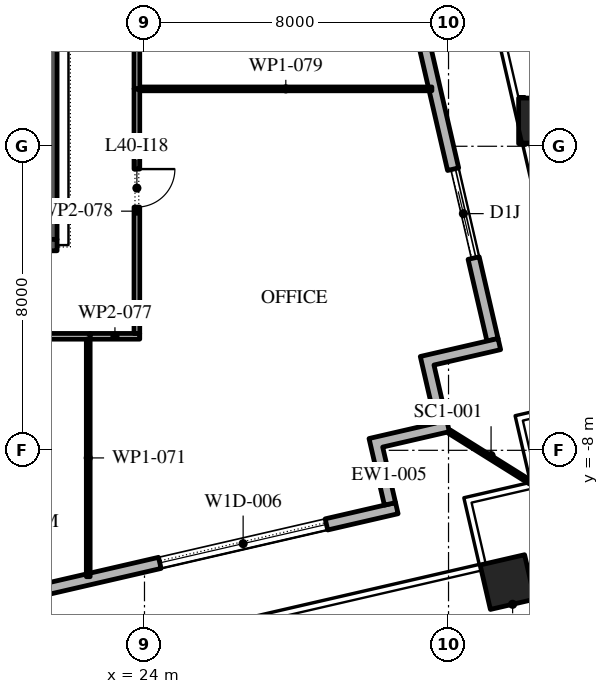
"""IFC4 building model, lengths in metres.
Left out: names, types, materials, properties, quantities, classifications, styles, units other than length and angle.
Written with IfcOpenShell. Run it as: python <this file> out.ifc"""

import sys

from ifc_helpers import new_model, si_unit, direction, frame, frame_2d, origin, origin_2d, place, context, subcontext, project, spatial, polyline, rectangle, outline, extrude, element, fill, save


model = new_model("IFC4")
c1 = context("Model", 3, precision=1e-05, world=origin(), true_north=direction((0.0, 1.0)))
c2 = subcontext(c1, "Body", "Model", "MODEL_VIEW")
j1 = project(units=[si_unit("LENGTHUNIT", "METRE"), si_unit("PLANEANGLEUNIT", "RADIAN")], contexts=[c1])
p1 = place(None, origin())
s1 = spatial("IfcSite", under=j1, at=p1, CompositionType="ELEMENT")
p2 = place(p1, origin())
s2 = spatial("IfcBuilding", under=s1, at=p2, CompositionType="ELEMENT")
p3 = place(p2, frame((0.0, 0.0, 184.2)))
s3 = spatial("IfcBuildingStorey", under=s2, at=p3, CompositionType="ELEMENT", Elevation=184.2)
p4 = place(p3, frame((33.551, -11.467, 0.0), z_axis=(0.0, 0.0, 1.0), x_axis=(0.974370064785, 0.224951054344, 0.0)))
e1 = element("IfcColumn", 1, at=p4, inside=s3, PredefinedType="COLUMN", context=c2, shape_type="SweptSolid", body=[
    extrude(rectangle(XDim=1.2, YDim=1.2, at=origin_2d()), origin(), (0.0, 0.0, 1.0), 4.2),
])
p5 = place(p3, frame((34.444, 0.668, 0.0), z_axis=(-0.00267375834, 0.011741286623, 0.999927493974), x_axis=(-0.975037935076, -0.222038341651, 0.0)))
e2 = element("IfcColumn", 2, at=p5, inside=s3, PredefinedType="COLUMN", context=c2, shape_type="SweptSolid", body=[
    extrude(rectangle(XDim=1.2, YDim=1.2, at=origin_2d()), origin(), (0.0, 0.0, 1.0), 4.2),
])
p6 = place(p3, frame((-17.592, -20.657, 0.0), z_axis=(0.0, 0.0, 1.0), x_axis=(0.974370243697, 0.224950279389, 0.0)))
e3 = element("IfcWall", 3, at=p6, inside=s3, PredefinedType="STANDARD", context=c2, shape_type="SweptSolid", body=[
    extrude(rectangle(XDim=49.5, YDim=0.3, at=frame_2d((24.75, 0.0))), origin(), (0.0, 0.0, 1.0), 4.0),
])
p7 = place(p6, frame((2.8, 0.0, 0.0)))
e4 = element("IfcOpeningElement", 4, at=p7, cuts=e3, PredefinedType="OPENING", context=c2, shape_type="SweptSolid", body=[
    extrude(rectangle(XDim=2.4, YDim=3.5, at=frame_2d((1.2, 1.75))), frame((0.0, 0.16, 0.0), z_axis=(0.0, -1.0, 0.0), x_axis=(1.0, 0.0, 0.0)), (0.0, 0.0, 1.0), 0.32),
])
p8 = place(p6, frame((9.9, 0.0, 0.45)))
e5 = element("IfcOpeningElement", 5, at=p8, cuts=e3, PredefinedType="OPENING", context=c2, shape_type="SweptSolid", body=[
    extrude(rectangle(XDim=4.5, YDim=2.575, at=frame_2d((2.25, 1.288))), frame((0.0, 0.16, 0.0), z_axis=(0.0, -1.0, 0.0), x_axis=(1.0, 0.0, 0.0)), (0.0, 0.0, 1.0), 0.32),
])
p9 = place(p6, frame((18.2, 0.0, 0.45)))
e6 = element("IfcOpeningElement", 6, at=p9, cuts=e3, PredefinedType="OPENING", context=c2, shape_type="SweptSolid", body=[
    extrude(rectangle(XDim=4.5, YDim=3.05, at=frame_2d((2.25, 1.525))), frame((0.0, 0.16, 0.0), z_axis=(0.0, -1.0, 0.0), x_axis=(1.0, 0.0, 0.0)), (0.0, 0.0, 1.0), 0.32),
])
p10 = place(p6, frame((26.5, 0.0, 0.45)))
e7 = element("IfcOpeningElement", 7, at=p10, cuts=e3, PredefinedType="OPENING", context=c2, shape_type="SweptSolid", body=[
    extrude(rectangle(XDim=4.5, YDim=2.75, at=frame_2d((2.25, 1.375))), frame((0.0, 0.16, 0.0), z_axis=(0.0, -1.0, 0.0), x_axis=(1.0, 0.0, 0.0)), (0.0, 0.0, 1.0), 0.32),
])
p11 = place(p6, frame((35.85, 0.0, 0.0)))
e8 = element("IfcOpeningElement", 8, at=p11, cuts=e3, PredefinedType="OPENING", context=c2, shape_type="SweptSolid", body=[
    extrude(rectangle(XDim=2.4, YDim=3.5, at=frame_2d((1.2, 1.75))), frame((0.0, 0.16, 0.0), z_axis=(0.0, -1.0, 0.0), x_axis=(1.0, 0.0, 0.0)), (0.0, 0.0, 1.0), 0.32),
])
p12 = place(p6, frame((43.1, 0.0, 0.45)))
e9 = element("IfcOpeningElement", 9, at=p12, cuts=e3, PredefinedType="OPENING", context=c2, shape_type="SweptSolid", body=[
    extrude(rectangle(XDim=4.5, YDim=2.875, at=frame_2d((2.25, 1.438))), frame((0.0, 0.16, 0.0), z_axis=(0.0, -1.0, 0.0), x_axis=(1.0, 0.0, 0.0)), (0.0, 0.0, 1.0), 0.32),
])
p13 = place(p3, frame((33.157, -5.092, 0.0), z_axis=(0.0, 0.0, 1.0), x_axis=(-0.224950279389, 0.974370243697, 0.0)))
e10 = element("IfcWall", 10, at=p13, inside=s3, PredefinedType="STANDARD", context=c2, shape_type="SweptSolid", body=[
    extrude(rectangle(XDim=49.5, YDim=0.3, at=frame_2d((24.75, 0.0))), origin(), (0.0, 0.0, 1.0), 4.0),
])
p14 = place(p13, frame((2.207, 0.0, 0.0)))
e11 = element("IfcOpeningElement", 11, at=p14, cuts=e10, PredefinedType="OPENING", context=c2, shape_type="SweptSolid", body=[
    extrude(rectangle(XDim=2.4, YDim=3.125, at=frame_2d((1.2, 1.562))), frame((0.0, 0.16, 0.0), z_axis=(0.0, -1.0, 0.0), x_axis=(1.0, 0.0, 0.0)), (0.0, 0.0, 1.0), 0.32),
])
p15 = place(p13, frame((8.121, 0.0, 0.45)))
e12 = element("IfcOpeningElement", 12, at=p15, cuts=e10, PredefinedType="OPENING", context=c2, shape_type="SweptSolid", body=[
    extrude(rectangle(XDim=4.5, YDim=2.875, at=frame_2d((2.25, 1.438))), frame((0.0, 0.16, 0.0), z_axis=(0.0, -1.0, 0.0), x_axis=(1.0, 0.0, 0.0)), (0.0, 0.0, 1.0), 0.32),
])
p16 = place(p13, frame((15.236, 0.0, 0.45)))
e13 = element("IfcOpeningElement", 13, at=p16, cuts=e10, PredefinedType="OPENING", context=c2, shape_type="SweptSolid", body=[
    extrude(rectangle(XDim=4.5, YDim=2.875, at=frame_2d((2.25, 1.438))), frame((0.0, 0.16, 0.0), z_axis=(0.0, -1.0, 0.0), x_axis=(1.0, 0.0, 0.0)), (0.0, 0.0, 1.0), 0.32),
])
p17 = place(p13, frame((22.35, 0.0, 0.45)))
e14 = element("IfcOpeningElement", 14, at=p17, cuts=e10, PredefinedType="OPENING", context=c2, shape_type="SweptSolid", body=[
    extrude(rectangle(XDim=4.5, YDim=3.0, at=frame_2d((2.25, 1.5))), frame((0.0, 0.16, 0.0), z_axis=(0.0, -1.0, 0.0), x_axis=(1.0, 0.0, 0.0)), (0.0, 0.0, 1.0), 0.32),
])
p18 = place(p13, frame((30.514, 0.0, 0.0)))
e15 = element("IfcOpeningElement", 15, at=p18, cuts=e10, PredefinedType="OPENING", context=c2, shape_type="SweptSolid", body=[
    extrude(rectangle(XDim=2.4, YDim=3.45, at=frame_2d((1.2, 1.725))), frame((0.0, 0.16, 0.0), z_axis=(0.0, -1.0, 0.0), x_axis=(1.0, 0.0, 0.0)), (0.0, 0.0, 1.0), 0.32),
])
p19 = place(p13, frame((36.579, 0.0, 0.45)))
e16 = element("IfcOpeningElement", 16, at=p19, cuts=e10, PredefinedType="OPENING", context=c2, shape_type="SweptSolid", body=[
    extrude(rectangle(XDim=4.5, YDim=3.05, at=frame_2d((2.25, 1.525))), frame((0.0, 0.16, 0.0), z_axis=(0.0, -1.0, 0.0), x_axis=(1.0, 0.0, 0.0)), (0.0, 0.0, 1.0), 0.32),
])
p20 = place(p13, frame((43.693, 0.0, 0.45)))
e17 = element("IfcOpeningElement", 17, at=p20, cuts=e10, PredefinedType="OPENING", context=c2, shape_type="SweptSolid", body=[
    extrude(rectangle(XDim=4.5, YDim=3.05, at=frame_2d((2.25, 1.525))), frame((0.0, 0.16, 0.0), z_axis=(0.0, -1.0, 0.0), x_axis=(1.0, 0.0, 0.0)), (0.0, 0.0, 1.0), 0.32),
])
p21 = place(p3, origin())
e18 = element("IfcWall", 18, at=p21, inside=s3, PredefinedType="STANDARD", context=c2, shape_type="SweptSolid", body=[
    extrude(outline(polyline([(31.662, -7.285), (31.257, -5.531), (33.303, -5.058), (33.371, -5.351), (31.617, -5.756), (32.022, -7.51), (30.268, -7.914), (30.605, -9.376), (30.313, -9.443), (29.908, -7.69), (31.662, -7.285)])), origin(), (0.0, 0.0, 1.0), 4.0),
])
p22 = place(p3, frame((32.022, -7.51, -0.05), z_axis=(0.0, 0.0, 1.0), x_axis=(0.848047176257, -0.529920736377, 0.0)))
e19 = element("IfcWall", 19, at=p22, inside=s3, PredefinedType="STANDARD", context=c2, shape_type="SweptSolid", body=[
    extrude(rectangle(XDim=2.526, YDim=0.1, at=frame_2d((1.263, 0.0))), origin(), (0.0, 0.0, 1.0), 4.05),
])
p23 = place(p3, frame((21.35, -2.45, 0.0), z_axis=(0.0, 0.0, 1.0), x_axis=(0.0, 1.0, 0.0)))
e20 = element("IfcWall", 20, at=p23, inside=s3, PredefinedType="SHEAR", context=c2, shape_type="SweptSolid", body=[
    extrude(rectangle(XDim=27.9, YDim=0.7, at=frame_2d((13.95, 0.0))), origin(), (0.0, 0.0, 1.0), 4.0),
])
p24 = place(p23, frame((5.05, 0.0, 0.0)))
e21 = element("IfcOpeningElement", 21, at=p24, cuts=e20, PredefinedType="OPENING", context=c2, shape_type="SweptSolid", body=[
    extrude(rectangle(XDim=1.2, YDim=2.1, at=frame_2d((0.6, 1.05))), frame((0.0, 0.36, 0.0), z_axis=(0.0, -1.0, 0.0), x_axis=(1.0, 0.0, 0.0)), (0.0, 0.0, 1.0), 0.72),
])
p25 = place(p23, frame((21.65, 0.0, 0.0)))
e22 = element("IfcOpeningElement", 22, at=p25, cuts=e20, PredefinedType="OPENING", context=c2, shape_type="SweptSolid", body=[
    extrude(rectangle(XDim=1.2, YDim=2.1, at=frame_2d((0.6, 1.05))), frame((0.0, 0.36, 0.0), z_axis=(0.0, -1.0, 0.0), x_axis=(1.0, 0.0, 0.0)), (0.0, 0.0, 1.0), 0.72),
])
p26 = place(p3, frame((10.3, -2.6, 0.0), z_axis=(0.0, 0.0, 1.0), x_axis=(1.0, 0.0, 0.0)))
e23 = element("IfcWall", 23, at=p26, inside=s3, PredefinedType="SHEAR", context=c2, shape_type="SweptSolid", body=[
    extrude(rectangle(XDim=11.4, YDim=0.3, at=frame_2d((5.7, 0.0))), origin(), (0.0, 0.0, 1.0), 4.0),
])
p27 = place(p3, frame((22.57, -5.0, 0.0), z_axis=(0.0, 0.0, 1.0), x_axis=(-1.0, 0.0, 0.0)))
e24 = element("IfcWall", 24, at=p27, inside=s3, PredefinedType="PARTITIONING", context=c2, shape_type="SweptSolid", body=[
    extrude(rectangle(XDim=8.14, YDim=0.15, at=frame_2d((4.07, 0.0))), origin(), (0.0, 0.0, 1.0), 4.0),
])
p28 = place(p27, frame((3.49, 0.0, 0.0)))
e25 = element("IfcOpeningElement", 25, at=p28, cuts=e24, PredefinedType="OPENING", context=c2, shape_type="SweptSolid", body=[
    extrude(rectangle(XDim=1.0, YDim=2.1, at=frame_2d((0.5, 1.05))), frame((0.0, 0.085, 0.0), z_axis=(0.0, -1.0, 0.0), x_axis=(1.0, 0.0, 0.0)), (0.0, 0.0, 1.0), 0.17),
])
p29 = place(p3, frame((22.52, -5.075, 0.0), z_axis=(0.0, 0.0, 1.0), x_axis=(0.0, -1.0, 0.0)))
e26 = element("IfcWall", 26, at=p29, inside=s3, PredefinedType="PARTITIONING", context=c2, shape_type="SweptSolid", body=[
    extrude(rectangle(XDim=6.25, YDim=0.1, at=frame_2d((3.125, 0.0))), origin(), (0.0, 0.0, 1.0), 4.0),
])
p30 = place(p3, frame((23.875, -5.0, 0.0), z_axis=(0.0, 0.0, 1.0), x_axis=(-1.0, 0.0, 0.0)))
e27 = element("IfcWall", 27, at=p30, inside=s3, PredefinedType="PARTITIONING", context=c2, shape_type="SweptSolid", body=[
    extrude(rectangle(XDim=1.305, YDim=0.15, at=frame_2d((0.652, 0.0))), origin(), (0.0, 0.0, 1.0), 4.0),
])
p31 = place(p3, frame((23.8, 1.51, 0.0), z_axis=(0.0, 0.0, 1.0), x_axis=(0.0, -1.0, 0.0)))
e28 = element("IfcWall", 28, at=p31, inside=s3, PredefinedType="PARTITIONING", context=c2, shape_type="SweptSolid", body=[
    extrude(rectangle(XDim=6.435, YDim=0.15, at=frame_2d((3.218, 0.0))), origin(), (0.0, 0.0, 1.0), 4.0),
])
p32 = place(p31, frame((2.11, 0.0, 0.0)))
e29 = element("IfcOpeningElement", 29, at=p32, cuts=e28, PredefinedType="OPENING", context=c2, shape_type="SweptSolid", body=[
    extrude(rectangle(XDim=1.0, YDim=2.1, at=frame_2d((0.5, 1.05))), frame((0.0, 0.085, 0.0), z_axis=(0.0, -1.0, 0.0), x_axis=(1.0, 0.0, 0.0)), (0.0, 0.0, 1.0), 0.17),
])
p33 = place(p3, frame((23.875, 1.51, 0.0), z_axis=(0.0, 0.0, 1.0), x_axis=(1.0, 0.0, 0.0)))
e30 = element("IfcWall", 30, at=p33, inside=s3, PredefinedType="PARTITIONING", context=c2, shape_type="SweptSolid", body=[
    extrude(rectangle(XDim=7.687, YDim=0.1, at=frame_2d((3.844, 0.0))), origin(), (0.0, 0.0, 1.0), 4.0),
])
p34 = place(p3, frame((23.8, 15.43, 0.0), z_axis=(0.0, 0.0, 1.0), x_axis=(0.0, -1.0, 0.0)))
e31 = element("IfcWall", 31, at=p34, inside=s3, PredefinedType="PARTITIONING", context=c2, shape_type="SweptSolid", body=[
    extrude(rectangle(XDim=13.92, YDim=0.15, at=frame_2d((6.96, 0.0))), origin(), (0.0, 0.0, 1.0), 4.0),
])
p35 = place(p34, frame((9.27, 0.0, 0.0)))
e32 = element("IfcOpeningElement", 32, at=p35, cuts=e31, PredefinedType="OPENING", context=c2, shape_type="SweptSolid", body=[
    extrude(rectangle(XDim=1.0, YDim=2.1, at=frame_2d((0.5, 1.05))), frame((0.0, 0.085, 0.0), z_axis=(0.0, -1.0, 0.0), x_axis=(1.0, 0.0, 0.0)), (0.0, 0.0, 1.0), 0.17),
])
p36 = place(p12, origin())
e33 = element("IfcWindow", 33, at=p36, inside=s3, PartitioningType="DOUBLE_PANEL_VERTICAL", PredefinedType="WINDOW", context=c2, shape_type="SweptSolid", body=[
    extrude(rectangle(XDim=4.5, YDim=2.875, at=frame_2d((2.25, 1.438))), frame((0.0, 0.03, 0.0), z_axis=(0.0, -1.0, 0.0), x_axis=(1.0, 0.0, 0.0)), (0.0, 0.0, 1.0), 0.06),
])
fill(e9, e33)
p37 = place(p14, origin())
e34 = element("IfcDoor", 34, at=p37, inside=s3, OperationType="DOUBLE_DOOR_SLIDING", PredefinedType="DOOR", context=c2, shape_type="SweptSolid", body=[
    extrude(rectangle(XDim=2.4, YDim=3.125, at=frame_2d((1.2, 1.562))), frame((0.0, 0.025, 0.0), z_axis=(0.0, -1.0, 0.0), x_axis=(1.0, 0.0, 0.0)), (0.0, 0.0, 1.0), 0.05),
])
fill(e11, e34)
p38 = place(p32, origin())
e35 = element("IfcDoor", 35, at=p38, inside=s3, OperationType="SINGLE_SWING_RIGHT", PredefinedType="DOOR", context=c2, shape_type="SweptSolid", body=[
    extrude(rectangle(XDim=1.0, YDim=2.1, at=frame_2d((0.5, 1.05))), frame((0.0, 0.025, 0.0), z_axis=(0.0, -1.0, 0.0), x_axis=(1.0, 0.0, 0.0)), (0.0, 0.0, 1.0), 0.05),
])
fill(e29, e35)
save(model, sys.argv[1])
